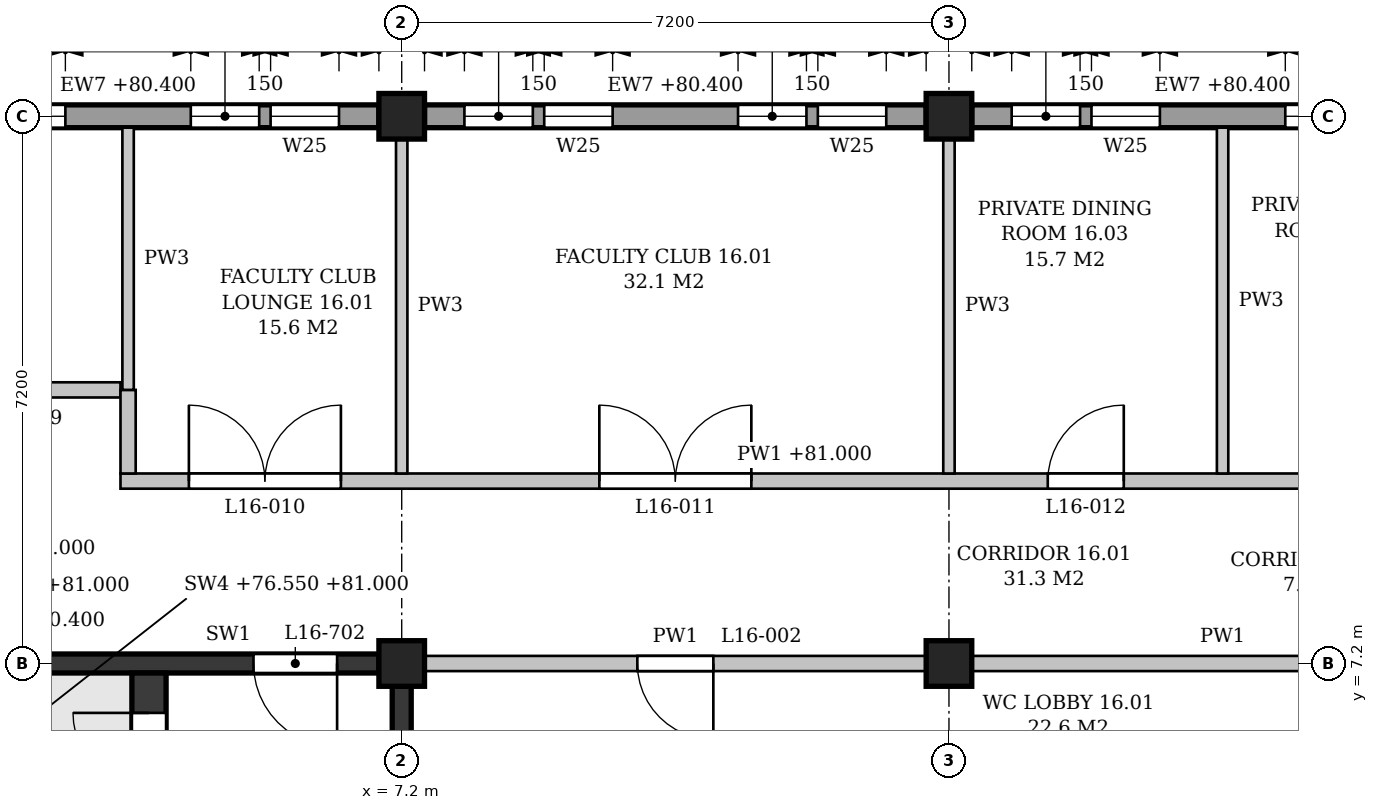
"""IFC4 building model, lengths in metres.
Left out: names, types, materials, properties, quantities, classifications, styles, units other than length and angle.
Written with IfcOpenShell. Run it as: python <this file> out.ifc"""

import sys

from ifc_helpers import new_model, si_unit, direction, frame, frame_2d, origin, origin_2d, place, context, subcontext, project, spatial, polyline, rectangle, outline, extrude, element, fill, save


model = new_model("IFC4")
c1 = context("Model", 3, precision=1e-05, world=origin(), true_north=direction((0.0, 1.0)))
c2 = subcontext(c1, "Body", "Model", "MODEL_VIEW")
j1 = project(units=[si_unit("LENGTHUNIT", "METRE"), si_unit("PLANEANGLEUNIT", "RADIAN")], contexts=[c1])
p1 = place(None, origin())
s1 = spatial("IfcSite", under=j1, at=p1, CompositionType="ELEMENT")
p2 = place(p1, origin())
s2 = spatial("IfcBuilding", under=s1, at=p2, CompositionType="ELEMENT")
p3 = place(p2, frame((0.0, 0.0, 76.8)))
s3 = spatial("IfcBuildingStorey", under=s2, at=p3, CompositionType="ELEMENT", Elevation=76.8)
for number, where, z_axis, x_axis in (
    (1, (7.2, 7.2, 0.0), (0.0, 0.0, 1.0), (1.0, 0.0, 0.0)),
    (2, (7.2, 14.4, 0.0), (0.0, 0.0, 1.0), (1.0, 0.0, 0.0)),
    (3, (14.4, 7.2, 0.0), (0.0, 0.0, 1.0), (1.0, 0.0, 0.0)),
    (4, (14.4, 14.4, 0.0), (0.0, 0.0, 1.0), (1.0, 0.0, 0.0)),
):
    element("IfcColumn", number, at=place(p3, frame(where, z_axis=z_axis, x_axis=x_axis)), inside=s3, PredefinedType="COLUMN", context=c2, shape_type="SweptSolid", body=[
        extrude(rectangle(XDim=0.6, YDim=0.6, at=origin_2d()), origin(), (0.0, 0.0, 1.0), 4.5),
    ])
p4 = place(p3, frame((21.3, 14.4, 0.0), z_axis=(0.0, 0.0, 1.0), x_axis=(-1.0, 0.0, 0.0)))
e5 = element("IfcWall", 5, at=p4, inside=s3, PredefinedType="STANDARD", context=c2, shape_type="SweptSolid", body=[
    extrude(rectangle(XDim=6.6, YDim=0.3, at=frame_2d((3.3, 0.0))), origin(), (0.0, 0.0, 1.0), 3.6),
])
p5 = place(p4, frame((0.525, 0.0, 0.9)))
e6 = element("IfcOpeningElement", 6, at=p5, cuts=e5, PredefinedType="OPENING", context=c2, shape_type="SweptSolid", body=[
    extrude(outline(polyline([(0.0, 0.0), (0.9, 0.0), (0.9, 2.15), (0.45, 2.6), (0.0, 2.15), (0.0, 0.0)])), frame((0.0, 0.16, 0.0), z_axis=(0.0, -1.0, 0.0), x_axis=(1.0, 0.0, 0.0)), (0.0, 0.0, 1.0), 0.32),
])
p6 = place(p4, frame((1.575, 0.0, 0.9)))
e7 = element("IfcOpeningElement", 7, at=p6, cuts=e5, PredefinedType="OPENING", context=c2, shape_type="SweptSolid", body=[
    extrude(outline(polyline([(0.0, 0.0), (0.9, 0.0), (0.9, 2.15), (0.45, 2.6), (0.0, 2.15), (0.0, 0.0)])), frame((0.0, 0.16, 0.0), z_axis=(0.0, -1.0, 0.0), x_axis=(1.0, 0.0, 0.0)), (0.0, 0.0, 1.0), 0.32),
])
p7 = place(p4, frame((4.125, 0.0, 0.9)))
e8 = element("IfcOpeningElement", 8, at=p7, cuts=e5, PredefinedType="OPENING", context=c2, shape_type="SweptSolid", body=[
    extrude(outline(polyline([(0.0, 0.0), (0.9, 0.0), (0.9, 2.15), (0.45, 2.6), (0.0, 2.15), (0.0, 0.0)])), frame((0.0, 0.16, 0.0), z_axis=(0.0, -1.0, 0.0), x_axis=(1.0, 0.0, 0.0)), (0.0, 0.0, 1.0), 0.32),
])
p8 = place(p4, frame((5.175, 0.0, 0.9)))
e9 = element("IfcOpeningElement", 9, at=p8, cuts=e5, PredefinedType="OPENING", context=c2, shape_type="SweptSolid", body=[
    extrude(outline(polyline([(0.0, 0.0), (0.9, 0.0), (0.9, 2.15), (0.45, 2.6), (0.0, 2.15), (0.0, 0.0)])), frame((0.0, 0.16, 0.0), z_axis=(0.0, -1.0, 0.0), x_axis=(1.0, 0.0, 0.0)), (0.0, 0.0, 1.0), 0.32),
])
p9 = place(p3, frame((14.1, 14.4, 0.0), z_axis=(0.0, 0.0, 1.0), x_axis=(-1.0, 0.0, 0.0)))
e10 = element("IfcWall", 10, at=p9, inside=s3, PredefinedType="STANDARD", context=c2, shape_type="SweptSolid", body=[
    extrude(rectangle(XDim=6.6, YDim=0.3, at=frame_2d((3.3, 0.0))), origin(), (0.0, 0.0, 1.0), 3.6),
])
p10 = place(p9, frame((0.525, 0.0, 0.9)))
e11 = element("IfcOpeningElement", 11, at=p10, cuts=e10, PredefinedType="OPENING", context=c2, shape_type="SweptSolid", body=[
    extrude(outline(polyline([(0.0, 0.0), (0.9, 0.0), (0.9, 2.15), (0.45, 2.6), (0.0, 2.15), (0.0, 0.0)])), frame((0.0, 0.16, 0.0), z_axis=(0.0, -1.0, 0.0), x_axis=(1.0, 0.0, 0.0)), (0.0, 0.0, 1.0), 0.32),
])
p11 = place(p9, frame((1.575, 0.0, 0.9)))
e12 = element("IfcOpeningElement", 12, at=p11, cuts=e10, PredefinedType="OPENING", context=c2, shape_type="SweptSolid", body=[
    extrude(outline(polyline([(0.0, 0.0), (0.9, 0.0), (0.9, 2.15), (0.45, 2.6), (0.0, 2.15), (0.0, 0.0)])), frame((0.0, 0.16, 0.0), z_axis=(0.0, -1.0, 0.0), x_axis=(1.0, 0.0, 0.0)), (0.0, 0.0, 1.0), 0.32),
])
p12 = place(p9, frame((4.125, 0.0, 0.9)))
e13 = element("IfcOpeningElement", 13, at=p12, cuts=e10, PredefinedType="OPENING", context=c2, shape_type="SweptSolid", body=[
    extrude(outline(polyline([(0.0, 0.0), (0.9, 0.0), (0.9, 2.15), (0.45, 2.6), (0.0, 2.15), (0.0, 0.0)])), frame((0.0, 0.16, 0.0), z_axis=(0.0, -1.0, 0.0), x_axis=(1.0, 0.0, 0.0)), (0.0, 0.0, 1.0), 0.32),
])
p13 = place(p9, frame((5.175, 0.0, 0.9)))
e14 = element("IfcOpeningElement", 14, at=p13, cuts=e10, PredefinedType="OPENING", context=c2, shape_type="SweptSolid", body=[
    extrude(outline(polyline([(0.0, 0.0), (0.9, 0.0), (0.9, 2.15), (0.45, 2.6), (0.0, 2.15), (0.0, 0.0)])), frame((0.0, 0.16, 0.0), z_axis=(0.0, -1.0, 0.0), x_axis=(1.0, 0.0, 0.0)), (0.0, 0.0, 1.0), 0.32),
])
p14 = place(p3, frame((6.9, 14.4, 0.0), z_axis=(0.0, 0.0, 1.0), x_axis=(-1.0, 0.0, 0.0)))
e15 = element("IfcWall", 15, at=p14, inside=s3, PredefinedType="STANDARD", context=c2, shape_type="SweptSolid", body=[
    extrude(rectangle(XDim=6.6, YDim=0.3, at=frame_2d((3.3, 0.0))), origin(), (0.0, 0.0, 1.0), 3.6),
])
p15 = place(p14, frame((0.525, 0.0, 0.9)))
e16 = element("IfcOpeningElement", 16, at=p15, cuts=e15, PredefinedType="OPENING", context=c2, shape_type="SweptSolid", body=[
    extrude(outline(polyline([(0.0, 0.0), (0.9, 0.0), (0.9, 2.15), (0.45, 2.6), (0.0, 2.15), (0.0, 0.0)])), frame((0.0, 0.16, 0.0), z_axis=(0.0, -1.0, 0.0), x_axis=(1.0, 0.0, 0.0)), (0.0, 0.0, 1.0), 0.32),
])
p16 = place(p14, frame((1.575, 0.0, 0.9)))
e17 = element("IfcOpeningElement", 17, at=p16, cuts=e15, PredefinedType="OPENING", context=c2, shape_type="SweptSolid", body=[
    extrude(outline(polyline([(0.0, 0.0), (0.9, 0.0), (0.9, 2.15), (0.45, 2.6), (0.0, 2.15), (0.0, 0.0)])), frame((0.0, 0.16, 0.0), z_axis=(0.0, -1.0, 0.0), x_axis=(1.0, 0.0, 0.0)), (0.0, 0.0, 1.0), 0.32),
])
p17 = place(p14, frame((4.125, 0.0, 0.9)))
e18 = element("IfcOpeningElement", 18, at=p17, cuts=e15, PredefinedType="OPENING", context=c2, shape_type="SweptSolid", body=[
    extrude(outline(polyline([(0.0, 0.0), (0.9, 0.0), (0.9, 2.15), (0.45, 2.6), (0.0, 2.15), (0.0, 0.0)])), frame((0.0, 0.16, 0.0), z_axis=(0.0, -1.0, 0.0), x_axis=(1.0, 0.0, 0.0)), (0.0, 0.0, 1.0), 0.32),
])
p18 = place(p14, frame((5.175, 0.0, 0.9)))
e19 = element("IfcOpeningElement", 19, at=p18, cuts=e15, PredefinedType="OPENING", context=c2, shape_type="SweptSolid", body=[
    extrude(outline(polyline([(0.0, 0.0), (0.9, 0.0), (0.9, 2.15), (0.45, 2.6), (0.0, 2.15), (0.0, 0.0)])), frame((0.0, 0.16, 0.0), z_axis=(0.0, -1.0, 0.0), x_axis=(1.0, 0.0, 0.0)), (0.0, 0.0, 1.0), 0.32),
])
p19 = place(p3, frame((0.3, 7.2, 0.0), z_axis=(0.0, 0.0, 1.0), x_axis=(1.0, 0.0, 0.0)))
e20 = element("IfcWall", 20, at=p19, inside=s3, PredefinedType="SHEAR", context=c2, shape_type="SweptSolid", body=[
    extrude(rectangle(XDim=6.6, YDim=0.25, at=frame_2d((3.3, 0.0))), origin(), (0.0, 0.0, 1.0), 3.55),
])
p20 = place(p19, frame((4.95, 0.0, 0.0)))
e21 = element("IfcOpeningElement", 21, at=p20, cuts=e20, PredefinedType="OPENING", context=c2, shape_type="SweptSolid", body=[
    extrude(rectangle(XDim=1.1, YDim=2.1, at=frame_2d((0.55, 1.05))), frame((0.0, 0.135, 0.0), z_axis=(0.0, -1.0, 0.0), x_axis=(1.0, 0.0, 0.0)), (0.0, 0.0, 1.0), 0.27),
])
p21 = place(p3, frame((7.2, 0.3, 0.0), z_axis=(0.0, 0.0, 1.0), x_axis=(0.0, 1.0, 0.0)))
e22 = element("IfcWall", 22, at=p21, inside=s3, PredefinedType="SHEAR", context=c2, shape_type="SweptSolid", body=[
    extrude(rectangle(XDim=6.6, YDim=0.25, at=frame_2d((3.3, 0.0))), origin(), (0.0, 0.0, 1.0), 3.55),
])
p22 = place(p3, frame((3.875, 0.15, 0.0), z_axis=(0.0, 0.0, 1.0), x_axis=(0.0, 1.0, 0.0)))
e23 = element("IfcWall", 23, at=p22, inside=s3, PredefinedType="SHEAR", context=c2, shape_type="SweptSolid", body=[
    extrude(rectangle(XDim=6.925, YDim=0.45, at=frame_2d((3.462, 0.0))), origin(), (0.0, 0.0, 1.0), 4.2),
])
p23 = place(p22, frame((5.4, 0.0, 0.0)))
e24 = element("IfcOpeningElement", 24, at=p23, cuts=e23, PredefinedType="OPENING", context=c2, shape_type="SweptSolid", body=[
    extrude(rectangle(XDim=1.0, YDim=2.1, at=frame_2d((0.5, 1.05))), frame((0.0, 0.235, 0.0), z_axis=(0.0, -1.0, 0.0), x_axis=(1.0, 0.0, 0.0)), (0.0, 0.0, 1.0), 0.47),
])
p24 = place(p3, frame((7.5, 7.2, 0.0), z_axis=(0.0, 0.0, 1.0), x_axis=(1.0, 0.0, 0.0)))
e25 = element("IfcWall", 25, at=p24, inside=s3, PredefinedType="PARTITIONING", context=c2, shape_type="SweptSolid", body=[
    extrude(rectangle(XDim=6.6, YDim=0.2, at=frame_2d((3.3, 0.0))), origin(), (0.0, 0.0, 1.0), 3.55),
])
p25 = place(p24, frame((2.8, 0.0, 0.0)))
e26 = element("IfcOpeningElement", 26, at=p25, cuts=e25, PredefinedType="OPENING", context=c2, shape_type="SweptSolid", body=[
    extrude(rectangle(XDim=1.0, YDim=2.1, at=frame_2d((0.5, 1.05))), frame((0.0, 0.11, 0.0), z_axis=(0.0, -1.0, 0.0), x_axis=(1.0, 0.0, 0.0)), (0.0, 0.0, 1.0), 0.22),
])
p26 = place(p3, frame((14.7, 7.2, 0.0), z_axis=(0.0, 0.0, 1.0), x_axis=(1.0, 0.0, 0.0)))
e27 = element("IfcWall", 27, at=p26, inside=s3, PredefinedType="PARTITIONING", context=c2, shape_type="SweptSolid", body=[
    extrude(rectangle(XDim=6.6, YDim=0.2, at=frame_2d((3.3, 0.0))), origin(), (0.0, 0.0, 1.0), 3.55),
])
p27 = place(p26, frame((4.45, 0.0, 0.0)))
e28 = element("IfcOpeningElement", 28, at=p27, cuts=e27, PredefinedType="OPENING", context=c2, shape_type="SweptSolid", body=[
    extrude(rectangle(XDim=1.0, YDim=2.1, at=frame_2d((0.5, 1.05))), frame((0.0, 0.11, 0.0), z_axis=(0.0, -1.0, 0.0), x_axis=(1.0, 0.0, 0.0)), (0.0, 0.0, 1.0), 0.22),
])
p28 = place(p3, frame((3.5, 9.6, 0.0), z_axis=(0.0, 0.0, 1.0), x_axis=(1.0, 0.0, 0.0)))
e29 = element("IfcWall", 29, at=p28, inside=s3, PredefinedType="PARTITIONING", context=c2, shape_type="SweptSolid", body=[
    extrude(outline(polyline([(0.0, 0.0), (18.0, 0.0), (18.0, 3.55), (17.875, 3.55), (17.875, 4.2), (11.125, 4.2), (11.125, 3.55), (10.675, 3.55), (10.675, 4.2), (3.925, 4.2), (3.925, 3.55), (3.475, 3.55), (3.475, 4.2), (0.0, 4.2), (0.0, 0.0)])), frame((0.0, 0.1, 0.0), z_axis=(0.0, -1.0, 0.0), x_axis=(1.0, 0.0, 0.0)), (0.0, 0.0, 1.0), 0.2),
])
p29 = place(p28, frame((15.75, 0.0, 0.0)))
e30 = element("IfcOpeningElement", 30, at=p29, cuts=e29, PredefinedType="OPENING", context=c2, shape_type="SweptSolid", body=[
    extrude(rectangle(XDim=1.0, YDim=2.1, at=frame_2d((0.5, 1.05))), frame((0.0, 0.11, 0.0), z_axis=(0.0, -1.0, 0.0), x_axis=(1.0, 0.0, 0.0)), (0.0, 0.0, 1.0), 0.22),
])
p30 = place(p28, frame((0.9, 0.0, 0.0)))
e31 = element("IfcOpeningElement", 31, at=p30, cuts=e29, PredefinedType="OPENING", context=c2, shape_type="SweptSolid", body=[
    extrude(rectangle(XDim=2.0, YDim=2.1, at=frame_2d((1.0, 1.05))), frame((0.0, 0.11, 0.0), z_axis=(0.0, -1.0, 0.0), x_axis=(1.0, 0.0, 0.0)), (0.0, 0.0, 1.0), 0.22),
])
p31 = place(p28, frame((6.3, 0.0, 0.0)))
e32 = element("IfcOpeningElement", 32, at=p31, cuts=e29, PredefinedType="OPENING", context=c2, shape_type="SweptSolid", body=[
    extrude(rectangle(XDim=2.0, YDim=2.1, at=frame_2d((1.0, 1.05))), frame((0.0, 0.11, 0.0), z_axis=(0.0, -1.0, 0.0), x_axis=(1.0, 0.0, 0.0)), (0.0, 0.0, 1.0), 0.22),
])
p32 = place(p28, frame((12.2, 0.0, 0.0)))
e33 = element("IfcOpeningElement", 33, at=p32, cuts=e29, PredefinedType="OPENING", context=c2, shape_type="SweptSolid", body=[
    extrude(rectangle(XDim=1.0, YDim=2.1, at=frame_2d((0.5, 1.05))), frame((0.0, 0.11, 0.0), z_axis=(0.0, -1.0, 0.0), x_axis=(1.0, 0.0, 0.0)), (0.0, 0.0, 1.0), 0.22),
])
p33 = place(p3, frame((0.15, 10.8, 0.0), z_axis=(0.0, 0.0, 1.0), x_axis=(1.0, 0.0, 0.0)))
e34 = element("IfcWall", 34, at=p33, inside=s3, PredefinedType="PARTITIONING", context=c2, shape_type="SweptSolid", body=[
    extrude(outline(polyline([(0.0, 0.0), (3.35, 0.0), (3.35, 4.2), (0.05, 4.2), (0.05, 3.6), (0.0, 3.6), (0.0, 0.0)])), frame((0.0, 0.1, 0.0), z_axis=(0.0, -1.0, 0.0), x_axis=(1.0, 0.0, 0.0)), (0.0, 0.0, 1.0), 0.2),
])
p34 = place(p33, frame((1.175, 0.0, 0.0)))
e35 = element("IfcOpeningElement", 35, at=p34, cuts=e34, PredefinedType="OPENING", context=c2, shape_type="SweptSolid", body=[
    extrude(rectangle(XDim=1.0, YDim=2.1, at=frame_2d((0.5, 1.05))), frame((0.0, 0.11, 0.0), z_axis=(0.0, -1.0, 0.0), x_axis=(1.0, 0.0, 0.0)), (0.0, 0.0, 1.0), 0.22),
])
p35 = place(p3, frame((3.6, 9.7, 0.0), z_axis=(0.0, 0.0, 1.0), x_axis=(0.0, 1.0, 0.0)))
e36 = element("IfcWall", 36, at=p35, inside=s3, PredefinedType="PARTITIONING", context=c2, shape_type="SweptSolid", body=[
    extrude(rectangle(XDim=1.1, YDim=0.2, at=frame_2d((0.55, 0.0))), origin(), (0.0, 0.0, 1.0), 4.2),
])
p36 = place(p3, frame((3.6, 10.8, 0.0), z_axis=(0.0, 0.0, 1.0), x_axis=(0.0, 1.0, 0.0)))
e37 = element("IfcWall", 37, at=p36, inside=s3, PredefinedType="PARTITIONING", context=c2, shape_type="SweptSolid", body=[
    extrude(rectangle(XDim=3.45, YDim=0.15, at=frame_2d((1.725, 0.0))), origin(), (0.0, 0.0, 1.0), 3.55),
])
for number, where, z_axis, x_axis in (
    (38, (7.2, 9.7, 0.0), (0.0, 0.0, 1.0), (0.0, 1.0, 0.0)),
    (39, (14.4, 9.7, 0.0), (0.0, 0.0, 1.0), (0.0, 1.0, 0.0)),
):
    element("IfcWall", number, at=place(p3, frame(where, z_axis=z_axis, x_axis=x_axis)), inside=s3, PredefinedType="PARTITIONING", context=c2, shape_type="SweptSolid", body=[
        extrude(rectangle(XDim=4.4, YDim=0.15, at=frame_2d((2.2, 0.0))), origin(), (0.0, 0.0, 1.0), 3.55),
    ])
p37 = place(p3, frame((18.0, 9.7, 0.0), z_axis=(0.0, 0.0, 1.0), x_axis=(0.0, 1.0, 0.0)))
e40 = element("IfcWall", 40, at=p37, inside=s3, PredefinedType="PARTITIONING", context=c2, shape_type="SweptSolid", body=[
    extrude(rectangle(XDim=4.55, YDim=0.15, at=frame_2d((2.275, 0.0))), origin(), (0.0, 0.0, 1.0), 3.55),
])
p38 = place(p6, origin())
e41 = element("IfcWindow", 41, at=p38, inside=s3, PartitioningType="SINGLE_PANEL", PredefinedType="WINDOW", context=c2, shape_type="SweptSolid", body=[
    extrude(outline(polyline([(0.0, 0.0), (0.9, 0.0), (0.9, 2.15), (0.45, 2.6), (0.0, 2.15), (0.0, 0.0)])), frame((0.0, 0.03, 0.0), z_axis=(0.0, -1.0, 0.0), x_axis=(1.0, 0.0, 0.0)), (0.0, 0.0, 1.0), 0.06),
])
fill(e7, e41)
p39 = place(p7, origin())
e42 = element("IfcWindow", 42, at=p39, inside=s3, PartitioningType="SINGLE_PANEL", PredefinedType="WINDOW", context=c2, shape_type="SweptSolid", body=[
    extrude(outline(polyline([(0.0, 0.0), (0.9, 0.0), (0.9, 2.15), (0.45, 2.6), (0.0, 2.15), (0.0, 0.0)])), frame((0.0, 0.03, 0.0), z_axis=(0.0, -1.0, 0.0), x_axis=(1.0, 0.0, 0.0)), (0.0, 0.0, 1.0), 0.06),
])
fill(e8, e42)
p40 = place(p8, origin())
e43 = element("IfcWindow", 43, at=p40, inside=s3, PartitioningType="SINGLE_PANEL", PredefinedType="WINDOW", context=c2, shape_type="SweptSolid", body=[
    extrude(outline(polyline([(0.0, 0.0), (0.9, 0.0), (0.9, 2.15), (0.45, 2.6), (0.0, 2.15), (0.0, 0.0)])), frame((0.0, 0.03, 0.0), z_axis=(0.0, -1.0, 0.0), x_axis=(1.0, 0.0, 0.0)), (0.0, 0.0, 1.0), 0.06),
])
fill(e9, e43)
p41 = place(p10, origin())
e44 = element("IfcWindow", 44, at=p41, inside=s3, PartitioningType="SINGLE_PANEL", PredefinedType="WINDOW", context=c2, shape_type="SweptSolid", body=[
    extrude(outline(polyline([(0.0, 0.0), (0.9, 0.0), (0.9, 2.15), (0.45, 2.6), (0.0, 2.15), (0.0, 0.0)])), frame((0.0, 0.03, 0.0), z_axis=(0.0, -1.0, 0.0), x_axis=(1.0, 0.0, 0.0)), (0.0, 0.0, 1.0), 0.06),
])
fill(e11, e44)
p42 = place(p11, origin())
e45 = element("IfcWindow", 45, at=p42, inside=s3, PartitioningType="SINGLE_PANEL", PredefinedType="WINDOW", context=c2, shape_type="SweptSolid", body=[
    extrude(outline(polyline([(0.0, 0.0), (0.9, 0.0), (0.9, 2.15), (0.45, 2.6), (0.0, 2.15), (0.0, 0.0)])), frame((0.0, 0.03, 0.0), z_axis=(0.0, -1.0, 0.0), x_axis=(1.0, 0.0, 0.0)), (0.0, 0.0, 1.0), 0.06),
])
fill(e12, e45)
p43 = place(p12, origin())
e46 = element("IfcWindow", 46, at=p43, inside=s3, PartitioningType="SINGLE_PANEL", PredefinedType="WINDOW", context=c2, shape_type="SweptSolid", body=[
    extrude(outline(polyline([(0.0, 0.0), (0.9, 0.0), (0.9, 2.15), (0.45, 2.6), (0.0, 2.15), (0.0, 0.0)])), frame((0.0, 0.03, 0.0), z_axis=(0.0, -1.0, 0.0), x_axis=(1.0, 0.0, 0.0)), (0.0, 0.0, 1.0), 0.06),
])
fill(e13, e46)
p44 = place(p13, origin())
e47 = element("IfcWindow", 47, at=p44, inside=s3, PartitioningType="SINGLE_PANEL", PredefinedType="WINDOW", context=c2, shape_type="SweptSolid", body=[
    extrude(outline(polyline([(0.0, 0.0), (0.9, 0.0), (0.9, 2.15), (0.45, 2.6), (0.0, 2.15), (0.0, 0.0)])), frame((0.0, 0.03, 0.0), z_axis=(0.0, -1.0, 0.0), x_axis=(1.0, 0.0, 0.0)), (0.0, 0.0, 1.0), 0.06),
])
fill(e14, e47)
p45 = place(p15, origin())
e48 = element("IfcWindow", 48, at=p45, inside=s3, PartitioningType="SINGLE_PANEL", PredefinedType="WINDOW", context=c2, shape_type="SweptSolid", body=[
    extrude(outline(polyline([(0.0, 0.0), (0.9, 0.0), (0.9, 2.15), (0.45, 2.6), (0.0, 2.15), (0.0, 0.0)])), frame((0.0, 0.03, 0.0), z_axis=(0.0, -1.0, 0.0), x_axis=(1.0, 0.0, 0.0)), (0.0, 0.0, 1.0), 0.06),
])
fill(e16, e48)
p46 = place(p16, origin())
e49 = element("IfcWindow", 49, at=p46, inside=s3, PartitioningType="SINGLE_PANEL", PredefinedType="WINDOW", context=c2, shape_type="SweptSolid", body=[
    extrude(outline(polyline([(0.0, 0.0), (0.9, 0.0), (0.9, 2.15), (0.45, 2.6), (0.0, 2.15), (0.0, 0.0)])), frame((0.0, 0.03, 0.0), z_axis=(0.0, -1.0, 0.0), x_axis=(1.0, 0.0, 0.0)), (0.0, 0.0, 1.0), 0.06),
])
fill(e17, e49)
p47 = place(p17, origin())
e50 = element("IfcWindow", 50, at=p47, inside=s3, PartitioningType="SINGLE_PANEL", PredefinedType="WINDOW", context=c2, shape_type="SweptSolid", body=[
    extrude(outline(polyline([(0.0, 0.0), (0.9, 0.0), (0.9, 2.15), (0.45, 2.6), (0.0, 2.15), (0.0, 0.0)])), frame((0.0, 0.03, 0.0), z_axis=(0.0, -1.0, 0.0), x_axis=(1.0, 0.0, 0.0)), (0.0, 0.0, 1.0), 0.06),
])
fill(e18, e50)
p48 = place(p23, origin())
e51 = element("IfcDoor", 51, at=p48, inside=s3, OperationType="SINGLE_SWING_RIGHT", PredefinedType="DOOR", context=c2, shape_type="SweptSolid", body=[
    extrude(rectangle(XDim=1.0, YDim=2.1, at=frame_2d((0.5, 1.05))), frame((0.0, 0.025, 0.0), z_axis=(0.0, -1.0, 0.0), x_axis=(1.0, 0.0, 0.0)), (0.0, 0.0, 1.0), 0.05),
])
fill(e24, e51)
p49 = place(p20, frame((1.1, 0.0, 0.0), z_axis=(0.0, 0.0, 1.0), x_axis=(-1.0, 0.0, 0.0)))
e52 = element("IfcDoor", 52, at=p49, inside=s3, OperationType="SINGLE_SWING_LEFT", PredefinedType="DOOR", context=c2, shape_type="SweptSolid", body=[
    extrude(rectangle(XDim=1.1, YDim=2.1, at=frame_2d((0.55, 1.05))), frame((0.0, 0.025, 0.0), z_axis=(0.0, -1.0, 0.0), x_axis=(1.0, 0.0, 0.0)), (0.0, 0.0, 1.0), 0.05),
])
fill(e21, e52)
p50 = place(p25, frame((1.0, 0.0, 0.0), z_axis=(0.0, 0.0, 1.0), x_axis=(-1.0, 0.0, 0.0)))
e53 = element("IfcDoor", 53, at=p50, inside=s3, OperationType="SINGLE_SWING_LEFT", PredefinedType="DOOR", context=c2, shape_type="SweptSolid", body=[
    extrude(rectangle(XDim=1.0, YDim=2.1, at=frame_2d((0.5, 1.05))), frame((0.0, 0.025, 0.0), z_axis=(0.0, -1.0, 0.0), x_axis=(1.0, 0.0, 0.0)), (0.0, 0.0, 1.0), 0.05),
])
fill(e26, e53)
p51 = place(p30, origin())
e54 = element("IfcDoor", 54, at=p51, inside=s3, OperationType="DOUBLE_DOOR_SINGLE_SWING", PredefinedType="DOOR", context=c2, shape_type="SweptSolid", body=[
    extrude(rectangle(XDim=2.0, YDim=2.1, at=frame_2d((1.0, 1.05))), frame((0.0, 0.025, 0.0), z_axis=(0.0, -1.0, 0.0), x_axis=(1.0, 0.0, 0.0)), (0.0, 0.0, 1.0), 0.05),
])
fill(e31, e54)
p52 = place(p31, origin())
e55 = element("IfcDoor", 55, at=p52, inside=s3, OperationType="DOUBLE_DOOR_SINGLE_SWING", PredefinedType="DOOR", context=c2, shape_type="SweptSolid", body=[
    extrude(rectangle(XDim=2.0, YDim=2.1, at=frame_2d((1.0, 1.05))), frame((0.0, 0.025, 0.0), z_axis=(0.0, -1.0, 0.0), x_axis=(1.0, 0.0, 0.0)), (0.0, 0.0, 1.0), 0.05),
])
fill(e32, e55)
p53 = place(p32, origin())
e56 = element("IfcDoor", 56, at=p53, inside=s3, OperationType="SINGLE_SWING_RIGHT", PredefinedType="DOOR", context=c2, shape_type="SweptSolid", body=[
    extrude(rectangle(XDim=1.0, YDim=2.1, at=frame_2d((0.5, 1.05))), frame((0.0, 0.025, 0.0), z_axis=(0.0, -1.0, 0.0), x_axis=(1.0, 0.0, 0.0)), (0.0, 0.0, 1.0), 0.05),
])
fill(e33, e56)
save(model, sys.argv[1])
